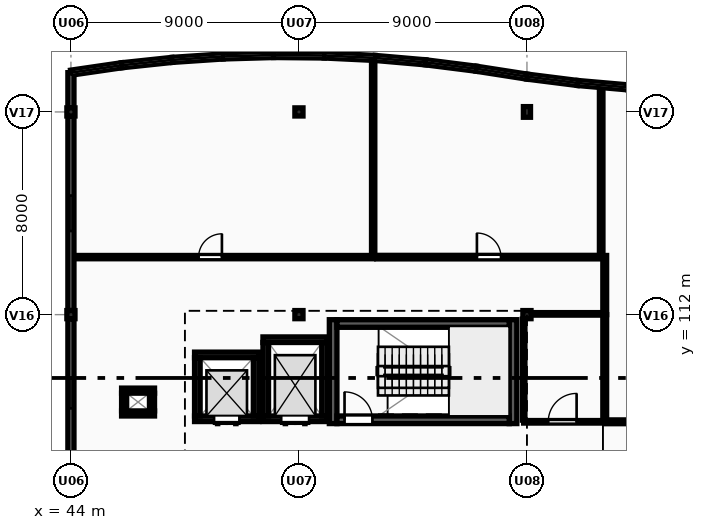
"""IFC4 building model, lengths in metres.
Left out: names, types, materials, properties, quantities, classifications, styles, units other than length and angle.
Written with IfcOpenShell. Run it as: python <this file> out.ifc"""

import sys

from ifc_helpers import new_model, si_unit, direction, frame, frame_2d, origin, origin_2d, place, context, subcontext, project, spatial, rectangle, extrude, element, fill, save


model = new_model("IFC4")
c1 = context("Model", 3, precision=1e-05, world=origin(), true_north=direction((0.0, 1.0)))
c2 = subcontext(c1, "Body", "Model", "MODEL_VIEW")
j1 = project(units=[si_unit("LENGTHUNIT", "METRE"), si_unit("PLANEANGLEUNIT", "RADIAN")], contexts=[c1])
p1 = place(None, origin())
s1 = spatial("IfcSite", under=j1, at=p1, CompositionType="ELEMENT")
p2 = place(p1, origin())
s2 = spatial("IfcBuilding", under=s1, at=p2, CompositionType="ELEMENT")
p3 = place(p2, frame((0.0, 0.0, 16.2)))
s3 = spatial("IfcBuildingStorey", under=s2, at=p3, CompositionType="ELEMENT", Elevation=16.2)
for number, where, z_axis, x_axis in (
    (1, (44.0, 112.0, 0.0), (0.0, 0.0, 1.0), (1.0, 0.0, 0.0)),
    (2, (44.0, 120.0, 0.0), (0.0, 0.0, 1.0), (1.0, 0.0, 0.0)),
    (3, (53.0, 112.0, 0.0), (0.0, 0.0, 1.0), (1.0, 0.0, 0.0)),
    (4, (53.0, 120.0, 0.0), (0.0, 0.0, 1.0), (1.0, 0.0, 0.0)),
    (5, (62.0, 112.0, 0.0), (0.0, 0.0, 1.0), (1.0, 0.0, 0.0)),
):
    element("IfcColumn", number, at=place(p3, frame(where, z_axis=z_axis, x_axis=x_axis)), inside=s3, PredefinedType="COLUMN", context=c2, shape_type="SweptSolid", body=[
        extrude(rectangle(XDim=0.32, YDim=0.32, at=origin_2d()), origin(), (0.0, 0.0, 1.0), 3.9),
    ])
p4 = place(p3, frame((62.0, 120.0, 0.0), z_axis=(0.0, 0.0, 1.0), x_axis=(1.0, 0.0, 0.0)))
e6 = element("IfcColumn", 6, at=p4, inside=s3, PredefinedType="PILASTER", context=c2, shape_type="SweptSolid", body=[
    extrude(rectangle(XDim=0.28, YDim=0.42, at=origin_2d()), origin(), (0.0, 0.0, 1.0), 3.9),
])
p5 = place(p3, frame((44.0, 121.55, 0.0), z_axis=(0.0, 0.0, 1.0), x_axis=(0.989544477223, 0.144228040259, 0.0)))
e7 = element("IfcWall", 7, at=p5, inside=s3, PredefinedType="SOLIDWALL", context=c2, shape_type="SweptSolid", body=[
    extrude(rectangle(XDim=2.021, YDim=0.2, at=frame_2d((1.011, 0.0))), origin(), (0.0, 0.0, 1.0), 0.95),
])
p6 = place(p3, frame((46.0, 121.842, 0.0), z_axis=(0.0, 0.0, 1.0), x_axis=(0.994395160059, 0.105727317433, 0.0)))
e8 = element("IfcWall", 8, at=p6, inside=s3, PredefinedType="SOLIDWALL", context=c2, shape_type="SweptSolid", body=[
    extrude(rectangle(XDim=2.011, YDim=0.2, at=frame_2d((1.006, 0.0))), origin(), (0.0, 0.0, 1.0), 0.95),
])
p7 = place(p3, frame((48.0, 122.054, 0.0), z_axis=(0.0, 0.0, 1.0), x_axis=(0.997729302978, 0.067351599676, 0.0)))
e9 = element("IfcWall", 9, at=p7, inside=s3, PredefinedType="SOLIDWALL", context=c2, shape_type="SweptSolid", body=[
    extrude(rectangle(XDim=2.005, YDim=0.2, at=frame_2d((1.002, 0.0))), origin(), (0.0, 0.0, 1.0), 0.95),
])
p8 = place(p3, frame((50.0, 122.189, 0.0), z_axis=(0.0, 0.0, 1.0), x_axis=(0.999581770858, 0.028918564416, 0.0)))
e10 = element("IfcWall", 10, at=p8, inside=s3, PredefinedType="SOLIDWALL", context=c2, shape_type="SweptSolid", body=[
    extrude(rectangle(XDim=2.001, YDim=0.2, at=frame_2d((1.0, 0.0))), origin(), (0.0, 0.0, 1.0), 0.95),
])
p9 = place(p3, frame((52.0, 122.247, 0.0), z_axis=(0.0, 0.0, 1.0), x_axis=(0.999953504169, -0.009643106302, 0.0)))
e11 = element("IfcWall", 11, at=p9, inside=s3, PredefinedType="SOLIDWALL", context=c2, shape_type="SweptSolid", body=[
    extrude(rectangle(XDim=2.0, YDim=0.2, at=frame_2d((1.0, 0.0))), origin(), (0.0, 0.0, 1.0), 0.95),
])
p10 = place(p3, frame((54.0, 122.228, 0.0), z_axis=(0.0, 0.0, 1.0), x_axis=(0.99884540439, -0.048040172037, 0.0)))
e12 = element("IfcWall", 12, at=p10, inside=s3, PredefinedType="SOLIDWALL", context=c2, shape_type="SweptSolid", body=[
    extrude(rectangle(XDim=2.002, YDim=0.2, at=frame_2d((1.001, 0.0))), origin(), (0.0, 0.0, 1.0), 0.95),
])
p11 = place(p3, frame((56.0, 122.132, 0.0), z_axis=(0.0, 0.0, 1.0), x_axis=(0.996244237948, -0.086587633962, 0.0)))
e13 = element("IfcWall", 13, at=p11, inside=s3, PredefinedType="SOLIDWALL", context=c2, shape_type="SweptSolid", body=[
    extrude(rectangle(XDim=2.008, YDim=0.2, at=frame_2d((1.004, 0.0))), origin(), (0.0, 0.0, 1.0), 0.95),
])
p12 = place(p3, frame((58.0, 121.958, 0.0), z_axis=(0.0, 0.0, 1.0), x_axis=(0.992158168336, -0.124988675503, 0.0)))
e14 = element("IfcWall", 14, at=p12, inside=s3, PredefinedType="SOLIDWALL", context=c2, shape_type="SweptSolid", body=[
    extrude(rectangle(XDim=2.016, YDim=0.2, at=frame_2d((1.008, 0.0))), origin(), (0.0, 0.0, 1.0), 0.95),
])
p13 = place(p3, frame((60.0, 121.706, 0.0), z_axis=(0.0, 0.0, 1.0), x_axis=(0.988085509852, -0.153905897287, 0.0)))
e15 = element("IfcWall", 15, at=p13, inside=s3, PredefinedType="SOLIDWALL", context=c2, shape_type="SweptSolid", body=[
    extrude(rectangle(XDim=2.024, YDim=0.2, at=frame_2d((1.012, 0.0))), origin(), (0.0, 0.0, 1.0), 0.95),
])
p14 = place(p3, frame((62.0, 121.394, 0.0), z_axis=(0.0, 0.0, 1.0), x_axis=(0.992158168336, -0.124988675503, 0.0)))
e16 = element("IfcWall", 16, at=p14, inside=s3, PredefinedType="SOLIDWALL", context=c2, shape_type="SweptSolid", body=[
    extrude(rectangle(XDim=2.016, YDim=0.2, at=frame_2d((1.008, 0.0))), origin(), (0.0, 0.0, 1.0), 0.95),
])
p15 = place(p3, frame((64.0, 121.142, 0.0), z_axis=(0.0, 0.0, 1.0), x_axis=(0.996244237948, -0.086587633962, 0.0)))
e17 = element("IfcWall", 17, at=p15, inside=s3, PredefinedType="SOLIDWALL", context=c2, shape_type="SweptSolid", body=[
    extrude(rectangle(XDim=2.008, YDim=0.2, at=frame_2d((1.004, 0.0))), origin(), (0.0, 0.0, 1.0), 0.95),
])
p16 = place(p3, frame((44.0, 104.16, 0.0), z_axis=(0.0, 0.0, 1.0), x_axis=(0.0, 1.0, 0.0)))
e18 = element("IfcWall", 18, at=p16, inside=s3, PredefinedType="SOLIDWALL", context=c2, shape_type="SweptSolid", body=[
    extrude(rectangle(XDim=7.68, YDim=0.24, at=frame_2d((3.84, 0.0))), origin(), (0.0, 0.0, 1.0), 3.29),
])
p17 = place(p16, frame((4.14, 0.0, 0.95)))
e19 = element("IfcOpeningElement", 19, at=p17, cuts=e18, PredefinedType="OPENING", context=c2, shape_type="SweptSolid", body=[
    extrude(rectangle(XDim=1.2, YDim=1.65, at=frame_2d((0.6, 0.825))), frame((0.0, 0.13, 0.0), z_axis=(0.0, -1.0, 0.0), x_axis=(1.0, 0.0, 0.0)), (0.0, 0.0, 1.0), 0.26),
])
p18 = place(p3, frame((44.0, 112.16, 0.0), z_axis=(0.0, 0.0, 1.0), x_axis=(0.0, 1.0, 0.0)))
e20 = element("IfcWall", 20, at=p18, inside=s3, PredefinedType="SOLIDWALL", context=c2, shape_type="SweptSolid", body=[
    extrude(rectangle(XDim=7.68, YDim=0.24, at=frame_2d((3.84, 0.0))), origin(), (0.0, 0.0, 1.0), 3.29),
])
p19 = place(p18, frame((3.14, 0.0, 0.95)))
e21 = element("IfcOpeningElement", 21, at=p19, cuts=e20, PredefinedType="OPENING", context=c2, shape_type="SweptSolid", body=[
    extrude(rectangle(XDim=1.4, YDim=1.65, at=frame_2d((0.7, 0.825))), frame((0.0, 0.13, 0.0), z_axis=(0.0, -1.0, 0.0), x_axis=(1.0, 0.0, 0.0)), (0.0, 0.0, 1.0), 0.26),
])
p20 = place(p3, frame((44.0, 120.16, 0.0), z_axis=(0.0, 0.0, 1.0), x_axis=(0.0, 1.0, 0.0)))
e22 = element("IfcWall", 22, at=p20, inside=s3, PredefinedType="SOLIDWALL", context=c2, shape_type="SweptSolid", body=[
    extrude(rectangle(XDim=1.39, YDim=0.24, at=frame_2d((0.695, 0.0))), origin(), (0.0, 0.0, 1.0), 3.29),
])
for number, where, z_axis, x_axis in (
    (23, (54.35, 107.7, 0.0), (0.0, 0.0, 1.0), (0.0, 1.0, 0.0)),
    (24, (61.45, 111.8, 0.0), (0.0, 0.0, 1.0), (0.0, -1.0, 0.0)),
):
    element("IfcWall", number, at=place(p3, frame(where, z_axis=z_axis, x_axis=x_axis)), inside=s3, PredefinedType="SHEAR", context=c2, shape_type="SweptSolid", body=[
        extrude(rectangle(XDim=4.1, YDim=0.3, at=frame_2d((2.05, 0.0))), origin(), (0.0, 0.0, 1.0), 3.65),
    ])
p21 = place(p3, frame((54.5, 107.85, 0.0), z_axis=(0.0, 0.0, 1.0), x_axis=(1.0, 0.0, 0.0)))
e25 = element("IfcWall", 25, at=p21, inside=s3, PredefinedType="SHEAR", context=c2, shape_type="SweptSolid", body=[
    extrude(rectangle(XDim=6.8, YDim=0.3, at=frame_2d((3.4, 0.0))), origin(), (0.0, 0.0, 1.0), 3.65),
])
p22 = place(p21, frame((0.3, 0.0, 0.0)))
e26 = element("IfcOpeningElement", 26, at=p22, cuts=e25, PredefinedType="OPENING", context=c2, shape_type="SweptSolid", body=[
    extrude(rectangle(XDim=1.1, YDim=2.15, at=frame_2d((0.55, 1.075))), frame((0.0, 0.16, 0.0), z_axis=(0.0, -1.0, 0.0), x_axis=(1.0, 0.0, 0.0)), (0.0, 0.0, 1.0), 0.32),
])
p23 = place(p3, frame((61.3, 111.65, 0.0), z_axis=(0.0, 0.0, 1.0), x_axis=(-1.0, 0.0, 0.0)))
e27 = element("IfcWall", 27, at=p23, inside=s3, PredefinedType="SHEAR", context=c2, shape_type="SweptSolid", body=[
    extrude(rectangle(XDim=6.8, YDim=0.3, at=frame_2d((3.4, 0.0))), origin(), (0.0, 0.0, 1.0), 3.65),
])
p24 = place(p3, frame((54.12, 107.89, 0.0), z_axis=(0.0, 0.0, 1.0), x_axis=(-1.0, 0.0, 0.0)))
e28 = element("IfcWall", 28, at=p24, inside=s3, PredefinedType="SHEAR", context=c2, shape_type="SweptSolid", body=[
    extrude(rectangle(XDim=2.54, YDim=0.22, at=frame_2d((1.27, 0.0))), origin(), (0.0, 0.0, 1.0), 3.65),
])
p25 = place(p24, frame((0.72, 0.0, 0.0)))
e29 = element("IfcOpeningElement", 29, at=p25, cuts=e28, PredefinedType="OPENING", context=c2, shape_type="SweptSolid", body=[
    extrude(rectangle(XDim=1.1, YDim=2.15, at=frame_2d((0.55, 1.075))), frame((0.0, 0.12, 0.0), z_axis=(0.0, -1.0, 0.0), x_axis=(1.0, 0.0, 0.0)), (0.0, 0.0, 1.0), 0.24),
])
p26 = place(p3, frame((51.58, 111.01, 0.0), z_axis=(0.0, 0.0, 1.0), x_axis=(1.0, 0.0, 0.0)))
e30 = element("IfcWall", 30, at=p26, inside=s3, PredefinedType="SHEAR", context=c2, shape_type="SweptSolid", body=[
    extrude(rectangle(XDim=2.54, YDim=0.22, at=frame_2d((1.27, 0.0))), origin(), (0.0, 0.0, 1.0), 3.65),
])
for number, where, z_axis, x_axis in (
    (31, (51.69, 108.0, 0.0), (0.0, 0.0, 1.0), (0.0, 1.0, 0.0)),
    (32, (54.01, 110.9, 0.0), (0.0, 0.0, 1.0), (0.0, -1.0, 0.0)),
):
    element("IfcWall", number, at=place(p3, frame(where, z_axis=z_axis, x_axis=x_axis)), inside=s3, PredefinedType="SHEAR", context=c2, shape_type="SweptSolid", body=[
        extrude(rectangle(XDim=2.9, YDim=0.22, at=frame_2d((1.45, 0.0))), origin(), (0.0, 0.0, 1.0), 3.65),
    ])
p27 = place(p3, frame((51.42, 107.89, 0.0), z_axis=(0.0, 0.0, 1.0), x_axis=(-1.0, 0.0, 0.0)))
e33 = element("IfcWall", 33, at=p27, inside=s3, PredefinedType="SHEAR", context=c2, shape_type="SweptSolid", body=[
    extrude(rectangle(XDim=2.54, YDim=0.22, at=frame_2d((1.27, 0.0))), origin(), (0.0, 0.0, 1.0), 3.65),
])
p28 = place(p27, frame((0.77, 0.0, 0.0)))
e34 = element("IfcOpeningElement", 34, at=p28, cuts=e33, PredefinedType="OPENING", context=c2, shape_type="SweptSolid", body=[
    extrude(rectangle(XDim=1.0, YDim=2.15, at=frame_2d((0.5, 1.075))), frame((0.0, 0.12, 0.0), z_axis=(0.0, -1.0, 0.0), x_axis=(1.0, 0.0, 0.0)), (0.0, 0.0, 1.0), 0.24),
])
p29 = place(p3, frame((48.88, 110.41, 0.0), z_axis=(0.0, 0.0, 1.0), x_axis=(1.0, 0.0, 0.0)))
e35 = element("IfcWall", 35, at=p29, inside=s3, PredefinedType="SHEAR", context=c2, shape_type="SweptSolid", body=[
    extrude(rectangle(XDim=2.54, YDim=0.22, at=frame_2d((1.27, 0.0))), origin(), (0.0, 0.0, 1.0), 3.65),
])
for number, where, z_axis, x_axis in (
    (36, (48.99, 108.0, 0.0), (0.0, 0.0, 1.0), (0.0, 1.0, 0.0)),
    (37, (51.31, 110.3, 0.0), (0.0, 0.0, 1.0), (0.0, -1.0, 0.0)),
):
    element("IfcWall", number, at=place(p3, frame(where, z_axis=z_axis, x_axis=x_axis)), inside=s3, PredefinedType="SHEAR", context=c2, shape_type="SweptSolid", body=[
        extrude(rectangle(XDim=2.3, YDim=0.22, at=frame_2d((1.15, 0.0))), origin(), (0.0, 0.0, 1.0), 3.65),
    ])
for number, where, z_axis, x_axis in (
    (38, (47.3, 108.1, 0.0), (0.0, 0.0, 1.0), (-1.0, 0.0, 0.0)),
    (39, (46.0, 109.0, 0.0), (0.0, 0.0, 1.0), (1.0, 0.0, 0.0)),
):
    element("IfcWall", number, at=place(p3, frame(where, z_axis=z_axis, x_axis=x_axis)), inside=s3, PredefinedType="PARTITIONING", context=c2, shape_type="SweptSolid", body=[
        extrude(rectangle(XDim=1.3, YDim=0.2, at=frame_2d((0.65, 0.0))), origin(), (0.0, 0.0, 1.0), 3.65),
    ])
p30 = place(p3, frame((46.1, 108.2, 0.0), z_axis=(0.0, 0.0, 1.0), x_axis=(0.0, 1.0, 0.0)))
e40 = element("IfcWall", 40, at=p30, inside=s3, PredefinedType="PARTITIONING", context=c2, shape_type="SweptSolid", body=[
    extrude(rectangle(XDim=0.7, YDim=0.2, at=frame_2d((0.35, 0.0))), origin(), (0.0, 0.0, 1.0), 3.65),
])
p31 = place(p3, frame((47.2, 108.9, 0.0), z_axis=(0.0, 0.0, 1.0), x_axis=(0.0, -1.0, 0.0)))
e41 = element("IfcWall", 41, at=p31, inside=s3, PredefinedType="PARTITIONING", context=c2, shape_type="SweptSolid", body=[
    extrude(rectangle(XDim=0.7, YDim=0.2, at=frame_2d((0.35, 0.0))), origin(), (0.0, 0.0, 1.0), 3.25),
])
p32 = place(p3, frame((44.162, 114.27, 0.0), z_axis=(0.0, 0.0, 1.0), x_axis=(1.0, 0.0, 0.0)))
e42 = element("IfcWall", 42, at=p32, inside=s3, PredefinedType="PARTITIONING", context=c2, shape_type="SweptSolid", body=[
    extrude(rectangle(XDim=11.768, YDim=0.13, at=frame_2d((5.884, 0.0))), origin(), (0.0, 0.0, 1.0), 3.65),
])
p33 = place(p32, frame((4.878, 0.0, 0.0)))
e43 = element("IfcOpeningElement", 43, at=p33, cuts=e42, PredefinedType="OPENING", context=c2, shape_type="SweptSolid", body=[
    extrude(rectangle(XDim=0.92, YDim=2.1, at=frame_2d((0.46, 1.05))), frame((0.0, 0.075, 0.0), z_axis=(0.0, -1.0, 0.0), x_axis=(1.0, 0.0, 0.0)), (0.0, 0.0, 1.0), 0.15),
])
p34 = place(p3, frame((55.93, 114.35, 0.0), z_axis=(0.0, 0.0, 1.0), x_axis=(0.0, 1.0, 0.0)))
e44 = element("IfcWall", 44, at=p34, inside=s3, PredefinedType="PARTITIONING", context=c2, shape_type="SweptSolid", body=[
    extrude(rectangle(XDim=7.643, YDim=0.13, at=frame_2d((3.821, 0.0))), origin(), (0.0, 0.0, 1.0), 3.65),
])
p35 = place(p3, frame((56.07, 114.27, 0.0), z_axis=(0.0, 0.0, 1.0), x_axis=(1.0, 0.0, 0.0)))
e45 = element("IfcWall", 45, at=p35, inside=s3, PredefinedType="PARTITIONING", context=c2, shape_type="SweptSolid", body=[
    extrude(rectangle(XDim=8.86, YDim=0.14, at=frame_2d((4.43, 0.0))), origin(), (0.0, 0.0, 1.0), 3.65),
])
p36 = place(p35, frame((3.955, 0.0, 0.0)))
e46 = element("IfcOpeningElement", 46, at=p36, cuts=e45, PredefinedType="OPENING", context=c2, shape_type="SweptSolid", body=[
    extrude(rectangle(XDim=0.95, YDim=2.1, at=frame_2d((0.475, 1.05))), frame((0.0, 0.08, 0.0), z_axis=(0.0, -1.0, 0.0), x_axis=(1.0, 0.0, 0.0)), (0.0, 0.0, 1.0), 0.16),
])
p37 = place(p3, frame((64.93, 114.355, 0.0), z_axis=(0.0, 0.0, 1.0), x_axis=(0.0, 1.0, 0.0)))
e47 = element("IfcWall", 47, at=p37, inside=s3, PredefinedType="PARTITIONING", context=c2, shape_type="SweptSolid", body=[
    extrude(rectangle(XDim=6.564, YDim=0.14, at=frame_2d((3.282, 0.0))), origin(), (0.0, 0.0, 1.0), 3.65),
])
p38 = place(p3, frame((65.07, 107.77, 0.0), z_axis=(0.0, 0.0, 1.0), x_axis=(1.0, 0.0, 0.0)))
e48 = element("IfcWall", 48, at=p38, inside=s3, PredefinedType="PARTITIONING", context=c2, shape_type="SweptSolid", body=[
    extrude(rectangle(XDim=5.93, YDim=0.15, at=frame_2d((2.965, 0.0))), origin(), (0.0, 0.0, 1.0), 3.65),
])
p39 = place(p3, frame((65.07, 107.86, 0.0), z_axis=(0.0, 0.0, 1.0), x_axis=(0.0, 1.0, 0.0)))
e49 = element("IfcWall", 49, at=p39, inside=s3, PredefinedType="PARTITIONING", context=c2, shape_type="SweptSolid", body=[
    extrude(rectangle(XDim=4.14, YDim=0.15, at=frame_2d((2.07, 0.0))), origin(), (0.0, 0.0, 1.0), 3.65),
])
p40 = place(p3, frame((65.07, 112.0, 0.0), z_axis=(0.0, 0.0, 1.0), x_axis=(0.0, 1.0, 0.0)))
e50 = element("IfcWall", 50, at=p40, inside=s3, PredefinedType="PARTITIONING", context=c2, shape_type="SweptSolid", body=[
    extrude(rectangle(XDim=2.335, YDim=0.15, at=frame_2d((1.167, 0.0))), origin(), (0.0, 0.0, 1.0), 3.65),
])
p41 = place(p3, frame((61.87, 107.77, 0.0), z_axis=(0.0, 0.0, 1.0), x_axis=(1.0, 0.0, 0.0)))
e51 = element("IfcWall", 51, at=p41, inside=s3, PredefinedType="PARTITIONING", context=c2, shape_type="SweptSolid", body=[
    extrude(rectangle(XDim=3.06, YDim=0.1, at=frame_2d((1.53, 0.0))), origin(), (0.0, 0.0, 1.0), 3.65),
])
p42 = place(p41, frame((0.97, 0.0, 0.0)))
e52 = element("IfcOpeningElement", 52, at=p42, cuts=e51, PredefinedType="OPENING", context=c2, shape_type="SweptSolid", body=[
    extrude(rectangle(XDim=1.12, YDim=2.15, at=frame_2d((0.56, 1.075))), frame((0.0, 0.06, 0.0), z_axis=(0.0, -1.0, 0.0), x_axis=(1.0, 0.0, 0.0)), (0.0, 0.0, 1.0), 0.12),
])
p43 = place(p3, frame((62.175, 112.03, 0.0), z_axis=(0.0, 0.0, 1.0), x_axis=(1.0, 0.0, 0.0)))
e53 = element("IfcWall", 53, at=p43, inside=s3, PredefinedType="PARTITIONING", context=c2, shape_type="SweptSolid", body=[
    extrude(rectangle(XDim=2.755, YDim=0.1, at=frame_2d((1.377, 0.0))), origin(), (0.0, 0.0, 1.0), 3.65),
])
p44 = place(p3, frame((61.87, 107.835, 0.0), z_axis=(0.0, 0.0, 1.0), x_axis=(0.0, 1.0, 0.0)))
e54 = element("IfcWall", 54, at=p44, inside=s3, PredefinedType="PARTITIONING", context=c2, shape_type="SweptSolid", body=[
    extrude(rectangle(XDim=3.99, YDim=0.1, at=frame_2d((1.995, 0.0))), origin(), (0.0, 0.0, 1.0), 3.65),
])
p45 = place(p17, origin())
e55 = element("IfcWindow", 55, at=p45, inside=s3, PartitioningType="SINGLE_PANEL", PredefinedType="WINDOW", context=c2, shape_type="SweptSolid", body=[
    extrude(rectangle(XDim=1.2, YDim=1.65, at=frame_2d((0.6, 0.825))), frame((0.0, 0.03, 0.0), z_axis=(0.0, -1.0, 0.0), x_axis=(1.0, 0.0, 0.0)), (0.0, 0.0, 1.0), 0.06),
])
fill(e19, e55)
p46 = place(p19, origin())
e56 = element("IfcWindow", 56, at=p46, inside=s3, PartitioningType="SINGLE_PANEL", PredefinedType="WINDOW", context=c2, shape_type="SweptSolid", body=[
    extrude(rectangle(XDim=1.4, YDim=1.65, at=frame_2d((0.7, 0.825))), frame((0.0, 0.03, 0.0), z_axis=(0.0, -1.0, 0.0), x_axis=(1.0, 0.0, 0.0)), (0.0, 0.0, 1.0), 0.06),
])
fill(e21, e56)
p47 = place(p22, origin())
e57 = element("IfcDoor", 57, at=p47, inside=s3, OperationType="SINGLE_SWING_LEFT", PredefinedType="DOOR", context=c2, shape_type="SweptSolid", body=[
    extrude(rectangle(XDim=1.1, YDim=2.15, at=frame_2d((0.55, 1.075))), frame((0.0, 0.025, 0.0), z_axis=(0.0, -1.0, 0.0), x_axis=(1.0, 0.0, 0.0)), (0.0, 0.0, 1.0), 0.05),
])
fill(e26, e57)
p48 = place(p25, origin())
e58 = element("IfcDoor", 58, at=p48, inside=s3, OperationType="DOUBLE_DOOR_SLIDING", PredefinedType="DOOR", context=c2, shape_type="SweptSolid", body=[
    extrude(rectangle(XDim=1.1, YDim=2.15, at=frame_2d((0.55, 1.075))), frame((0.0, 0.025, 0.0), z_axis=(0.0, -1.0, 0.0), x_axis=(1.0, 0.0, 0.0)), (0.0, 0.0, 1.0), 0.05),
])
fill(e29, e58)
p49 = place(p28, origin())
e59 = element("IfcDoor", 59, at=p49, inside=s3, OperationType="DOUBLE_DOOR_SLIDING", PredefinedType="DOOR", context=c2, shape_type="SweptSolid", body=[
    extrude(rectangle(XDim=1.0, YDim=2.15, at=frame_2d((0.5, 1.075))), frame((0.0, 0.025, 0.0), z_axis=(0.0, -1.0, 0.0), x_axis=(1.0, 0.0, 0.0)), (0.0, 0.0, 1.0), 0.05),
])
fill(e34, e59)
p50 = place(p33, origin())
e60 = element("IfcDoor", 60, at=p50, inside=s3, OperationType="SINGLE_SWING_RIGHT", PredefinedType="DOOR", context=c2, shape_type="SweptSolid", body=[
    extrude(rectangle(XDim=0.92, YDim=2.1, at=frame_2d((0.46, 1.05))), frame((0.0, 0.025, 0.0), z_axis=(0.0, -1.0, 0.0), x_axis=(1.0, 0.0, 0.0)), (0.0, 0.0, 1.0), 0.05),
])
fill(e43, e60)
p51 = place(p36, origin())
e61 = element("IfcDoor", 61, at=p51, inside=s3, OperationType="SINGLE_SWING_LEFT", PredefinedType="DOOR", context=c2, shape_type="SweptSolid", body=[
    extrude(rectangle(XDim=0.95, YDim=2.1, at=frame_2d((0.475, 1.05))), frame((0.0, 0.025, 0.0), z_axis=(0.0, -1.0, 0.0), x_axis=(1.0, 0.0, 0.0)), (0.0, 0.0, 1.0), 0.05),
])
fill(e46, e61)
p52 = place(p42, origin())
e62 = element("IfcDoor", 62, at=p52, inside=s3, OperationType="SINGLE_SWING_RIGHT", PredefinedType="DOOR", context=c2, shape_type="SweptSolid", body=[
    extrude(rectangle(XDim=1.12, YDim=2.15, at=frame_2d((0.56, 1.075))), frame((0.0, 0.025, 0.0), z_axis=(0.0, -1.0, 0.0), x_axis=(1.0, 0.0, 0.0)), (0.0, 0.0, 1.0), 0.05),
])
fill(e52, e62)
save(model, sys.argv[1])
